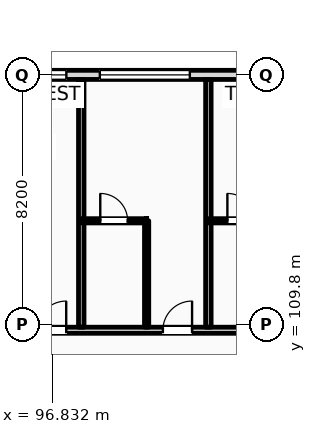
"""IFC4 building model, lengths in metres.
Left out: names, types, materials, properties, quantities, classifications, styles, units other than length and angle.
Written with IfcOpenShell. Run it as: python <this file> out.ifc"""

import sys

from ifc_helpers import new_model, si_unit, direction, frame, frame_2d, origin, place, context, subcontext, project, spatial, rectangle, extrude, element, fill, save


model = new_model("IFC4")
c1 = context("Model", 3, precision=1e-05, world=origin(), true_north=direction((0.0, 1.0)))
c2 = subcontext(c1, "Body", "Model", "MODEL_VIEW")
j1 = project(units=[si_unit("LENGTHUNIT", "METRE"), si_unit("PLANEANGLEUNIT", "RADIAN")], contexts=[c1])
p1 = place(None, origin())
s1 = spatial("IfcSite", under=j1, at=p1, CompositionType="ELEMENT")
p2 = place(p1, origin())
s2 = spatial("IfcBuilding", under=s1, at=p2, CompositionType="ELEMENT")
p3 = place(p2, frame((0.0, 0.0, 16.2)))
s3 = spatial("IfcBuildingStorey", under=s2, at=p3, CompositionType="ELEMENT", Elevation=16.2)
p4 = place(p3, frame((22.5, 118.0, 0.0), z_axis=(0.0, 0.0, 1.0), x_axis=(1.0, 0.0, 0.0)))
e1 = element("IfcWall", 1, at=p4, inside=s3, PredefinedType="STANDARD", context=c2, shape_type="SweptSolid", body=[
    extrude(rectangle(XDim=97.5, YDim=0.3, at=frame_2d((48.75, 0.0))), origin(), (0.0, 0.0, 1.0), 3.36),
])
p5 = place(p4, frame((3.721, 0.0, 0.9)))
e2 = element("IfcOpeningElement", 2, at=p5, cuts=e1, PredefinedType="OPENING", context=c2, shape_type="SweptSolid", body=[
    extrude(rectangle(XDim=0.9, YDim=1.8, at=frame_2d((0.45, 0.9))), frame((0.0, 0.16, 0.0), z_axis=(0.0, -1.0, 0.0), x_axis=(1.0, 0.0, 0.0)), (0.0, 0.0, 1.0), 0.32),
])
p6 = place(p4, frame((6.447, 0.0, 0.9)))
e3 = element("IfcOpeningElement", 3, at=p6, cuts=e1, PredefinedType="OPENING", context=c2, shape_type="SweptSolid", body=[
    extrude(rectangle(XDim=1.35, YDim=1.85, at=frame_2d((0.675, 0.925))), frame((0.0, 0.16, 0.0), z_axis=(0.0, -1.0, 0.0), x_axis=(1.0, 0.0, 0.0)), (0.0, 0.0, 1.0), 0.32),
])
p7 = place(p4, frame((11.363, 0.0, 0.9)))
e4 = element("IfcOpeningElement", 4, at=p7, cuts=e1, PredefinedType="OPENING", context=c2, shape_type="SweptSolid", body=[
    extrude(rectangle(XDim=1.5, YDim=1.9, at=frame_2d((0.75, 0.95))), frame((0.0, 0.16, 0.0), z_axis=(0.0, -1.0, 0.0), x_axis=(1.0, 0.0, 0.0)), (0.0, 0.0, 1.0), 0.32),
])
p8 = place(p4, frame((15.078, 0.0, 0.9)))
e5 = element("IfcOpeningElement", 5, at=p8, cuts=e1, PredefinedType="OPENING", context=c2, shape_type="SweptSolid", body=[
    extrude(rectangle(XDim=1.65, YDim=1.95, at=frame_2d((0.825, 0.975))), frame((0.0, 0.16, 0.0), z_axis=(0.0, -1.0, 0.0), x_axis=(1.0, 0.0, 0.0)), (0.0, 0.0, 1.0), 0.32),
])
p9 = place(p4, frame((19.395, 0.0, 0.9)))
e6 = element("IfcOpeningElement", 6, at=p9, cuts=e1, PredefinedType="OPENING", context=c2, shape_type="SweptSolid", body=[
    extrude(rectangle(XDim=1.8, YDim=2.0, at=frame_2d((0.9, 1.0))), frame((0.0, 0.16, 0.0), z_axis=(0.0, -1.0, 0.0), x_axis=(1.0, 0.0, 0.0)), (0.0, 0.0, 1.0), 0.32),
])
p10 = place(p4, frame((23.31, 0.0, 0.9)))
e7 = element("IfcOpeningElement", 7, at=p10, cuts=e1, PredefinedType="OPENING", context=c2, shape_type="SweptSolid", body=[
    extrude(rectangle(XDim=1.95, YDim=2.05, at=frame_2d((0.975, 1.025))), frame((0.0, 0.16, 0.0), z_axis=(0.0, -1.0, 0.0), x_axis=(1.0, 0.0, 0.0)), (0.0, 0.0, 1.0), 0.32),
])
p11 = place(p4, frame((28.026, 0.0, 0.9)))
e8 = element("IfcOpeningElement", 8, at=p11, cuts=e1, PredefinedType="OPENING", context=c2, shape_type="SweptSolid", body=[
    extrude(rectangle(XDim=2.1, YDim=2.1, at=frame_2d((1.05, 1.05))), frame((0.0, 0.16, 0.0), z_axis=(0.0, -1.0, 0.0), x_axis=(1.0, 0.0, 0.0)), (0.0, 0.0, 1.0), 0.32),
])
p12 = place(p4, frame((31.941, 0.0, 0.9)))
e9 = element("IfcOpeningElement", 9, at=p12, cuts=e1, PredefinedType="OPENING", context=c2, shape_type="SweptSolid", body=[
    extrude(rectangle(XDim=1.1, YDim=2.15, at=frame_2d((0.55, 1.075))), frame((0.0, 0.16, 0.0), z_axis=(0.0, -1.0, 0.0), x_axis=(1.0, 0.0, 0.0)), (0.0, 0.0, 1.0), 0.32),
])
p13 = place(p4, frame((36.657, 0.0, 0.9)))
e10 = element("IfcOpeningElement", 10, at=p13, cuts=e1, PredefinedType="OPENING", context=c2, shape_type="SweptSolid", body=[
    extrude(rectangle(XDim=2.4, YDim=2.2, at=frame_2d((1.2, 1.1))), frame((0.0, 0.16, 0.0), z_axis=(0.0, -1.0, 0.0), x_axis=(1.0, 0.0, 0.0)), (0.0, 0.0, 1.0), 0.32),
])
p14 = place(p4, frame((42.574, 0.0, 0.9)))
e11 = element("IfcOpeningElement", 11, at=p14, cuts=e1, PredefinedType="OPENING", context=c2, shape_type="SweptSolid", body=[
    extrude(rectangle(XDim=1.35, YDim=2.25, at=frame_2d((0.675, 1.125))), frame((0.0, 0.16, 0.0), z_axis=(0.0, -1.0, 0.0), x_axis=(1.0, 0.0, 0.0)), (0.0, 0.0, 1.0), 0.32),
])
p15 = place(p4, frame((45.289, 0.0, 0.9)))
e12 = element("IfcOpeningElement", 12, at=p15, cuts=e1, PredefinedType="OPENING", context=c2, shape_type="SweptSolid", body=[
    extrude(rectangle(XDim=2.7, YDim=2.28, at=frame_2d((1.35, 1.14))), frame((0.0, 0.16, 0.0), z_axis=(0.0, -1.0, 0.0), x_axis=(1.0, 0.0, 0.0)), (0.0, 0.0, 1.0), 0.32),
])
p16 = place(p4, frame((50.406, 0.0, 0.9)))
e13 = element("IfcOpeningElement", 13, at=p16, cuts=e1, PredefinedType="OPENING", context=c2, shape_type="SweptSolid", body=[
    extrude(rectangle(XDim=1.8, YDim=2.28, at=frame_2d((0.9, 1.14))), frame((0.0, 0.16, 0.0), z_axis=(0.0, -1.0, 0.0), x_axis=(1.0, 0.0, 0.0)), (0.0, 0.0, 1.0), 0.32),
])
p17 = place(p4, frame((53.922, 0.0, 0.9)))
e14 = element("IfcOpeningElement", 14, at=p17, cuts=e1, PredefinedType="OPENING", context=c2, shape_type="SweptSolid", body=[
    extrude(rectangle(XDim=1.8, YDim=2.28, at=frame_2d((0.9, 1.14))), frame((0.0, 0.16, 0.0), z_axis=(0.0, -1.0, 0.0), x_axis=(1.0, 0.0, 0.0)), (0.0, 0.0, 1.0), 0.32),
])
p18 = place(p4, frame((58.332, 0.0, 0.9)))
e15 = element("IfcOpeningElement", 15, at=p18, cuts=e1, PredefinedType="OPENING", context=c2, shape_type="SweptSolid", body=[
    extrude(rectangle(XDim=2.961, YDim=2.28, at=frame_2d((1.48, 1.14))), frame((0.0, 0.16, 0.0), z_axis=(0.0, -1.0, 0.0), x_axis=(1.0, 0.0, 0.0)), (0.0, 0.0, 1.0), 0.32),
])
p19 = place(p4, frame((62.513, 0.0, 0.9)))
e16 = element("IfcOpeningElement", 16, at=p19, cuts=e1, PredefinedType="OPENING", context=c2, shape_type="SweptSolid", body=[
    extrude(rectangle(XDim=1.8, YDim=2.28, at=frame_2d((0.9, 1.14))), frame((0.0, 0.16, 0.0), z_axis=(0.0, -1.0, 0.0), x_axis=(1.0, 0.0, 0.0)), (0.0, 0.0, 1.0), 0.32),
])
p20 = place(p4, frame((67.114, 0.0, 0.9)))
e17 = element("IfcOpeningElement", 17, at=p20, cuts=e1, PredefinedType="OPENING", context=c2, shape_type="SweptSolid", body=[
    extrude(rectangle(XDim=2.961, YDim=2.28, at=frame_2d((1.48, 1.14))), frame((0.0, 0.16, 0.0), z_axis=(0.0, -1.0, 0.0), x_axis=(1.0, 0.0, 0.0)), (0.0, 0.0, 1.0), 0.32),
])
p21 = place(p4, frame((73.695, 0.0, 0.9)))
e18 = element("IfcOpeningElement", 18, at=p21, cuts=e1, PredefinedType="OPENING", context=c2, shape_type="SweptSolid", body=[
    extrude(rectangle(XDim=1.1, YDim=2.28, at=frame_2d((0.55, 1.14))), frame((0.0, 0.16, 0.0), z_axis=(0.0, -1.0, 0.0), x_axis=(1.0, 0.0, 0.0)), (0.0, 0.0, 1.0), 0.32),
])
p22 = place(p4, frame((75.895, 0.0, 0.9)))
e19 = element("IfcOpeningElement", 19, at=p22, cuts=e1, PredefinedType="OPENING", context=c2, shape_type="SweptSolid", body=[
    extrude(rectangle(XDim=2.961, YDim=2.28, at=frame_2d((1.48, 1.14))), frame((0.0, 0.16, 0.0), z_axis=(0.0, -1.0, 0.0), x_axis=(1.0, 0.0, 0.0)), (0.0, 0.0, 1.0), 0.32),
])
p23 = place(p4, frame((81.676, 0.0, 0.9)))
e20 = element("IfcOpeningElement", 20, at=p23, cuts=e1, PredefinedType="OPENING", context=c2, shape_type="SweptSolid", body=[
    extrude(rectangle(XDim=1.8, YDim=2.28, at=frame_2d((0.9, 1.14))), frame((0.0, 0.16, 0.0), z_axis=(0.0, -1.0, 0.0), x_axis=(1.0, 0.0, 0.0)), (0.0, 0.0, 1.0), 0.32),
])
p24 = place(p4, frame((84.677, 0.0, 0.9)))
e21 = element("IfcOpeningElement", 21, at=p24, cuts=e1, PredefinedType="OPENING", context=c2, shape_type="SweptSolid", body=[
    extrude(rectangle(XDim=2.961, YDim=2.28, at=frame_2d((1.48, 1.14))), frame((0.0, 0.16, 0.0), z_axis=(0.0, -1.0, 0.0), x_axis=(1.0, 0.0, 0.0)), (0.0, 0.0, 1.0), 0.32),
])
p25 = place(p4, frame((89.999, 0.0, 0.9)))
e22 = element("IfcOpeningElement", 22, at=p25, cuts=e1, PredefinedType="OPENING", context=c2, shape_type="SweptSolid", body=[
    extrude(rectangle(XDim=1.1, YDim=1.5, at=frame_2d((0.55, 0.75))), frame((0.0, 0.16, 0.0), z_axis=(0.0, -1.0, 0.0), x_axis=(1.0, 0.0, 0.0)), (0.0, 0.0, 1.0), 0.32),
])
p26 = place(p4, frame((94.35, 0.0, 0.9)))
e23 = element("IfcOpeningElement", 23, at=p26, cuts=e1, PredefinedType="OPENING", context=c2, shape_type="SweptSolid", body=[
    extrude(rectangle(XDim=1.25, YDim=1.6, at=frame_2d((0.625, 0.8))), frame((0.0, 0.16, 0.0), z_axis=(0.0, -1.0, 0.0), x_axis=(1.0, 0.0, 0.0)), (0.0, 0.0, 1.0), 0.32),
])
p27 = place(p3, frame((10.65, 109.6, 0.0), z_axis=(0.0, 0.0, 1.0), x_axis=(1.0, 0.0, 0.0)))
e24 = element("IfcWall", 24, at=p27, inside=s3, PredefinedType="PARTITIONING", context=c2, shape_type="SweptSolid", body=[
    extrude(rectangle(XDim=109.21, YDim=0.2, at=frame_2d((54.605, 0.0))), origin(), (0.0, 0.0, 1.0), 3.36),
])
p28 = place(p27, frame((15.43, 0.0, 0.0)))
e25 = element("IfcOpeningElement", 25, at=p28, cuts=e24, PredefinedType="OPENING", context=c2, shape_type="SweptSolid", body=[
    extrude(rectangle(XDim=1.02, YDim=2.2, at=frame_2d((0.51, 1.1))), frame((0.0, 0.11, 0.0), z_axis=(0.0, -1.0, 0.0), x_axis=(1.0, 0.0, 0.0)), (0.0, 0.0, 1.0), 0.22),
])
p29 = place(p27, frame((19.537, 0.0, 0.0)))
e26 = element("IfcOpeningElement", 26, at=p29, cuts=e24, PredefinedType="OPENING", context=c2, shape_type="SweptSolid", body=[
    extrude(rectangle(XDim=1.02, YDim=2.2, at=frame_2d((0.51, 1.1))), frame((0.0, 0.11, 0.0), z_axis=(0.0, -1.0, 0.0), x_axis=(1.0, 0.0, 0.0)), (0.0, 0.0, 1.0), 0.22),
])
p30 = place(p27, frame((23.928, 0.0, 0.0)))
e27 = element("IfcOpeningElement", 27, at=p30, cuts=e24, PredefinedType="OPENING", context=c2, shape_type="SweptSolid", body=[
    extrude(rectangle(XDim=1.02, YDim=2.2, at=frame_2d((0.51, 1.1))), frame((0.0, 0.11, 0.0), z_axis=(0.0, -1.0, 0.0), x_axis=(1.0, 0.0, 0.0)), (0.0, 0.0, 1.0), 0.22),
])
p31 = place(p27, frame((26.169, 0.0, 0.0)))
e28 = element("IfcOpeningElement", 28, at=p31, cuts=e24, PredefinedType="OPENING", context=c2, shape_type="SweptSolid", body=[
    extrude(rectangle(XDim=1.02, YDim=2.2, at=frame_2d((0.51, 1.1))), frame((0.0, 0.11, 0.0), z_axis=(0.0, -1.0, 0.0), x_axis=(1.0, 0.0, 0.0)), (0.0, 0.0, 1.0), 0.22),
])
p32 = place(p27, frame((32.739, 0.0, 0.0)))
e29 = element("IfcOpeningElement", 29, at=p32, cuts=e24, PredefinedType="OPENING", context=c2, shape_type="SweptSolid", body=[
    extrude(rectangle(XDim=0.96, YDim=2.2, at=frame_2d((0.48, 1.1))), frame((0.0, 0.11, 0.0), z_axis=(0.0, -1.0, 0.0), x_axis=(1.0, 0.0, 0.0)), (0.0, 0.0, 1.0), 0.22),
])
p33 = place(p27, frame((34.98, 0.0, 0.0)))
e30 = element("IfcOpeningElement", 30, at=p33, cuts=e24, PredefinedType="OPENING", context=c2, shape_type="SweptSolid", body=[
    extrude(rectangle(XDim=0.96, YDim=2.2, at=frame_2d((0.48, 1.1))), frame((0.0, 0.11, 0.0), z_axis=(0.0, -1.0, 0.0), x_axis=(1.0, 0.0, 0.0)), (0.0, 0.0, 1.0), 0.22),
])
p34 = place(p27, frame((41.521, 0.0, 0.0)))
e31 = element("IfcOpeningElement", 31, at=p34, cuts=e24, PredefinedType="OPENING", context=c2, shape_type="SweptSolid", body=[
    extrude(rectangle(XDim=0.96, YDim=2.2, at=frame_2d((0.48, 1.1))), frame((0.0, 0.11, 0.0), z_axis=(0.0, -1.0, 0.0), x_axis=(1.0, 0.0, 0.0)), (0.0, 0.0, 1.0), 0.22),
])
p35 = place(p27, frame((43.512, 0.0, 0.0)))
e32 = element("IfcOpeningElement", 32, at=p35, cuts=e24, PredefinedType="OPENING", context=c2, shape_type="SweptSolid", body=[
    extrude(rectangle(XDim=0.96, YDim=2.2, at=frame_2d((0.48, 1.1))), frame((0.0, 0.11, 0.0), z_axis=(0.0, -1.0, 0.0), x_axis=(1.0, 0.0, 0.0)), (0.0, 0.0, 1.0), 0.22),
])
p36 = place(p27, frame((50.303, 0.0, 0.0)))
e33 = element("IfcOpeningElement", 33, at=p36, cuts=e24, PredefinedType="OPENING", context=c2, shape_type="SweptSolid", body=[
    extrude(rectangle(XDim=0.96, YDim=2.2, at=frame_2d((0.48, 1.1))), frame((0.0, 0.11, 0.0), z_axis=(0.0, -1.0, 0.0), x_axis=(1.0, 0.0, 0.0)), (0.0, 0.0, 1.0), 0.22),
])
p37 = place(p27, frame((54.944, 0.0, 0.0)))
e34 = element("IfcOpeningElement", 34, at=p37, cuts=e24, PredefinedType="OPENING", context=c2, shape_type="SweptSolid", body=[
    extrude(rectangle(XDim=0.96, YDim=2.2, at=frame_2d((0.48, 1.1))), frame((0.0, 0.11, 0.0), z_axis=(0.0, -1.0, 0.0), x_axis=(1.0, 0.0, 0.0)), (0.0, 0.0, 1.0), 0.22),
])
p38 = place(p27, frame((59.085, 0.0, 0.0)))
e35 = element("IfcOpeningElement", 35, at=p38, cuts=e24, PredefinedType="OPENING", context=c2, shape_type="SweptSolid", body=[
    extrude(rectangle(XDim=0.96, YDim=2.2, at=frame_2d((0.48, 1.1))), frame((0.0, 0.11, 0.0), z_axis=(0.0, -1.0, 0.0), x_axis=(1.0, 0.0, 0.0)), (0.0, 0.0, 1.0), 0.22),
])
p39 = place(p27, frame((63.476, 0.0, 0.0)))
e36 = element("IfcOpeningElement", 36, at=p39, cuts=e24, PredefinedType="OPENING", context=c2, shape_type="SweptSolid", body=[
    extrude(rectangle(XDim=0.96, YDim=2.2, at=frame_2d((0.48, 1.1))), frame((0.0, 0.11, 0.0), z_axis=(0.0, -1.0, 0.0), x_axis=(1.0, 0.0, 0.0)), (0.0, 0.0, 1.0), 0.22),
])
p40 = place(p27, frame((65.716, 0.0, 0.0)))
e37 = element("IfcOpeningElement", 37, at=p40, cuts=e24, PredefinedType="OPENING", context=c2, shape_type="SweptSolid", body=[
    extrude(rectangle(XDim=0.96, YDim=2.2, at=frame_2d((0.48, 1.1))), frame((0.0, 0.11, 0.0), z_axis=(0.0, -1.0, 0.0), x_axis=(1.0, 0.0, 0.0)), (0.0, 0.0, 1.0), 0.22),
])
p41 = place(p27, frame((72.257, 0.0, 0.0)))
e38 = element("IfcOpeningElement", 38, at=p41, cuts=e24, PredefinedType="OPENING", context=c2, shape_type="SweptSolid", body=[
    extrude(rectangle(XDim=0.96, YDim=2.2, at=frame_2d((0.48, 1.1))), frame((0.0, 0.11, 0.0), z_axis=(0.0, -1.0, 0.0), x_axis=(1.0, 0.0, 0.0)), (0.0, 0.0, 1.0), 0.22),
])
p42 = place(p27, frame((74.498, 0.0, 0.0)))
e39 = element("IfcOpeningElement", 39, at=p42, cuts=e24, PredefinedType="OPENING", context=c2, shape_type="SweptSolid", body=[
    extrude(rectangle(XDim=0.96, YDim=2.2, at=frame_2d((0.48, 1.1))), frame((0.0, 0.11, 0.0), z_axis=(0.0, -1.0, 0.0), x_axis=(1.0, 0.0, 0.0)), (0.0, 0.0, 1.0), 0.22),
])
p43 = place(p27, frame((81.039, 0.0, 0.0)))
e40 = element("IfcOpeningElement", 40, at=p43, cuts=e24, PredefinedType="OPENING", context=c2, shape_type="SweptSolid", body=[
    extrude(rectangle(XDim=0.96, YDim=2.2, at=frame_2d((0.48, 1.1))), frame((0.0, 0.11, 0.0), z_axis=(0.0, -1.0, 0.0), x_axis=(1.0, 0.0, 0.0)), (0.0, 0.0, 1.0), 0.22),
])
p44 = place(p27, frame((85.68, 0.0, 0.0)))
e41 = element("IfcOpeningElement", 41, at=p44, cuts=e24, PredefinedType="OPENING", context=c2, shape_type="SweptSolid", body=[
    extrude(rectangle(XDim=0.96, YDim=2.2, at=frame_2d((0.48, 1.1))), frame((0.0, 0.11, 0.0), z_axis=(0.0, -1.0, 0.0), x_axis=(1.0, 0.0, 0.0)), (0.0, 0.0, 1.0), 0.22),
])
p45 = place(p27, frame((89.82, 0.0, 0.0)))
e42 = element("IfcOpeningElement", 42, at=p45, cuts=e24, PredefinedType="OPENING", context=c2, shape_type="SweptSolid", body=[
    extrude(rectangle(XDim=0.96, YDim=2.2, at=frame_2d((0.48, 1.1))), frame((0.0, 0.11, 0.0), z_axis=(0.0, -1.0, 0.0), x_axis=(1.0, 0.0, 0.0)), (0.0, 0.0, 1.0), 0.22),
])
p46 = place(p27, frame((94.211, 0.0, 0.0)))
e43 = element("IfcOpeningElement", 43, at=p46, cuts=e24, PredefinedType="OPENING", context=c2, shape_type="SweptSolid", body=[
    extrude(rectangle(XDim=0.96, YDim=2.2, at=frame_2d((0.48, 1.1))), frame((0.0, 0.11, 0.0), z_axis=(0.0, -1.0, 0.0), x_axis=(1.0, 0.0, 0.0)), (0.0, 0.0, 1.0), 0.22),
])
p47 = place(p27, frame((98.602, 0.0, 0.0)))
e44 = element("IfcOpeningElement", 44, at=p47, cuts=e24, PredefinedType="OPENING", context=c2, shape_type="SweptSolid", body=[
    extrude(rectangle(XDim=0.96, YDim=2.2, at=frame_2d((0.48, 1.1))), frame((0.0, 0.11, 0.0), z_axis=(0.0, -1.0, 0.0), x_axis=(1.0, 0.0, 0.0)), (0.0, 0.0, 1.0), 0.22),
])
p48 = place(p27, frame((102.993, 0.0, 0.0)))
e45 = element("IfcOpeningElement", 45, at=p48, cuts=e24, PredefinedType="OPENING", context=c2, shape_type="SweptSolid", body=[
    extrude(rectangle(XDim=0.96, YDim=2.2, at=frame_2d((0.48, 1.1))), frame((0.0, 0.11, 0.0), z_axis=(0.0, -1.0, 0.0), x_axis=(1.0, 0.0, 0.0)), (0.0, 0.0, 1.0), 0.22),
])
p49 = place(p27, frame((105.269, 0.0, 0.0)))
e46 = element("IfcOpeningElement", 46, at=p49, cuts=e24, PredefinedType="OPENING", context=c2, shape_type="SweptSolid", body=[
    extrude(rectangle(XDim=0.96, YDim=2.2, at=frame_2d((0.48, 1.1))), frame((0.0, 0.11, 0.0), z_axis=(0.0, -1.0, 0.0), x_axis=(1.0, 0.0, 0.0)), (0.0, 0.0, 1.0), 0.22),
])
p50 = place(p27, frame((2.716, 0.0, 0.0)))
e47 = element("IfcOpeningElement", 47, at=p50, cuts=e24, PredefinedType="OPENING", context=c2, shape_type="SweptSolid", body=[
    extrude(rectangle(XDim=1.35, YDim=2.25, at=frame_2d((0.675, 1.125))), frame((0.0, 0.11, 0.0), z_axis=(0.0, -1.0, 0.0), x_axis=(1.0, 0.0, 0.0)), (0.0, 0.0, 1.0), 0.22),
])
p51 = place(p27, frame((6.65, 0.0, 0.0)))
e48 = element("IfcOpeningElement", 48, at=p51, cuts=e24, PredefinedType="OPENING", context=c2, shape_type="SweptSolid", body=[
    extrude(rectangle(XDim=1.35, YDim=2.25, at=frame_2d((0.675, 1.125))), frame((0.0, 0.11, 0.0), z_axis=(0.0, -1.0, 0.0), x_axis=(1.0, 0.0, 0.0)), (0.0, 0.0, 1.0), 0.22),
])
p52 = place(p27, frame((10.583, 0.0, 0.0)))
e49 = element("IfcOpeningElement", 49, at=p52, cuts=e24, PredefinedType="OPENING", context=c2, shape_type="SweptSolid", body=[
    extrude(rectangle(XDim=1.35, YDim=2.25, at=frame_2d((0.675, 1.125))), frame((0.0, 0.11, 0.0), z_axis=(0.0, -1.0, 0.0), x_axis=(1.0, 0.0, 0.0)), (0.0, 0.0, 1.0), 0.22),
])
p53 = place(p3, frame((97.785, 109.7, 0.0), z_axis=(0.0, 0.0, 1.0), x_axis=(0.0, 1.0, 0.0)))
e50 = element("IfcWall", 50, at=p53, inside=s3, PredefinedType="PARTITIONING", context=c2, shape_type="SweptSolid", body=[
    extrude(rectangle(XDim=8.15, YDim=0.18, at=frame_2d((4.075, 0.0))), origin(), (0.0, 0.0, 1.0), 3.61),
])
p54 = place(p3, frame((101.966, 109.7, 0.0), z_axis=(0.0, 0.0, 1.0), x_axis=(0.0, 1.0, 0.0)))
e51 = element("IfcWall", 51, at=p54, inside=s3, PredefinedType="PARTITIONING", context=c2, shape_type="SweptSolid", body=[
    extrude(rectangle(XDim=8.15, YDim=0.18, at=frame_2d((4.075, 0.0))), origin(), (0.0, 0.0, 1.0), 3.92),
])
p55 = place(p3, frame((99.935, 109.7, 0.0), z_axis=(0.0, 0.0, 1.0), x_axis=(0.0, 1.0, 0.0)))
e52 = element("IfcWall", 52, at=p55, inside=s3, PredefinedType="PARTITIONING", context=c2, shape_type="SweptSolid", body=[
    extrude(rectangle(XDim=3.5, YDim=0.14, at=frame_2d((1.75, 0.0))), origin(), (0.0, 0.0, 1.0), 3.92),
])
p56 = place(p3, frame((97.785, 113.2, 0.0), z_axis=(0.0, 0.0, 1.0), x_axis=(1.0, 0.0, 0.0)))
e53 = element("IfcWall", 53, at=p56, inside=s3, PredefinedType="PARTITIONING", context=c2, shape_type="SweptSolid", body=[
    extrude(rectangle(XDim=2.15, YDim=0.14, at=frame_2d((1.075, 0.0))), origin(), (0.0, 0.0, 1.0), 3.92),
])
p57 = place(p56, frame((0.625, 0.0, 0.0)))
e54 = element("IfcOpeningElement", 54, at=p57, cuts=e53, PredefinedType="OPENING", context=c2, shape_type="SweptSolid", body=[
    extrude(rectangle(XDim=0.9, YDim=2.1, at=frame_2d((0.45, 1.05))), frame((0.0, 0.08, 0.0), z_axis=(0.0, -1.0, 0.0), x_axis=(1.0, 0.0, 0.0)), (0.0, 0.0, 1.0), 0.16),
])
p58 = place(p3, frame((101.966, 113.2, 0.0), z_axis=(0.0, 0.0, 1.0), x_axis=(1.0, 0.0, 0.0)))
e55 = element("IfcWall", 55, at=p58, inside=s3, PredefinedType="PARTITIONING", context=c2, shape_type="SweptSolid", body=[
    extrude(rectangle(XDim=2.15, YDim=0.14, at=frame_2d((1.075, 0.0))), origin(), (0.0, 0.0, 1.0), 3.92),
])
p59 = place(p58, frame((0.625, 0.0, 0.0)))
e56 = element("IfcOpeningElement", 56, at=p59, cuts=e55, PredefinedType="OPENING", context=c2, shape_type="SweptSolid", body=[
    extrude(rectangle(XDim=0.9, YDim=2.1, at=frame_2d((0.45, 1.05))), frame((0.0, 0.08, 0.0), z_axis=(0.0, -1.0, 0.0), x_axis=(1.0, 0.0, 0.0)), (0.0, 0.0, 1.0), 0.16),
])
p60 = place(p21, origin())
e57 = element("IfcWindow", 57, at=p60, inside=s3, PartitioningType="DOUBLE_PANEL_VERTICAL", PredefinedType="WINDOW", context=c2, shape_type="SweptSolid", body=[
    extrude(rectangle(XDim=1.1, YDim=2.28, at=frame_2d((0.55, 1.14))), frame((0.0, 0.03, 0.0), z_axis=(0.0, -1.0, 0.0), x_axis=(1.0, 0.0, 0.0)), (0.0, 0.0, 1.0), 0.06),
])
fill(e18, e57)
p61 = place(p22, origin())
e58 = element("IfcWindow", 58, at=p61, inside=s3, PartitioningType="DOUBLE_PANEL_VERTICAL", PredefinedType="WINDOW", context=c2, shape_type="SweptSolid", body=[
    extrude(rectangle(XDim=2.961, YDim=2.28, at=frame_2d((1.48, 1.14))), frame((0.0, 0.03, 0.0), z_axis=(0.0, -1.0, 0.0), x_axis=(1.0, 0.0, 0.0)), (0.0, 0.0, 1.0), 0.06),
])
fill(e19, e58)
p62 = place(p44, origin())
e59 = element("IfcDoor", 59, at=p62, inside=s3, OperationType="SINGLE_SWING_RIGHT", PredefinedType="DOOR", context=c2, shape_type="SweptSolid", body=[
    extrude(rectangle(XDim=0.96, YDim=2.2, at=frame_2d((0.48, 1.1))), frame((0.0, 0.025, 0.0), z_axis=(0.0, -1.0, 0.0), x_axis=(1.0, 0.0, 0.0)), (0.0, 0.0, 1.0), 0.05),
])
fill(e41, e59)
p63 = place(p45, origin())
e60 = element("IfcDoor", 60, at=p63, inside=s3, OperationType="SINGLE_SWING_RIGHT", PredefinedType="DOOR", context=c2, shape_type="SweptSolid", body=[
    extrude(rectangle(XDim=0.96, YDim=2.2, at=frame_2d((0.48, 1.1))), frame((0.0, 0.025, 0.0), z_axis=(0.0, -1.0, 0.0), x_axis=(1.0, 0.0, 0.0)), (0.0, 0.0, 1.0), 0.05),
])
fill(e42, e60)
p64 = place(p57, origin())
e61 = element("IfcDoor", 61, at=p64, inside=s3, OperationType="SINGLE_SWING_LEFT", PredefinedType="DOOR", context=c2, shape_type="SweptSolid", body=[
    extrude(rectangle(XDim=0.9, YDim=2.1, at=frame_2d((0.45, 1.05))), frame((0.0, 0.025, 0.0), z_axis=(0.0, -1.0, 0.0), x_axis=(1.0, 0.0, 0.0)), (0.0, 0.0, 1.0), 0.05),
])
fill(e54, e61)
p65 = place(p59, origin())
e62 = element("IfcDoor", 62, at=p65, inside=s3, OperationType="SINGLE_SWING_LEFT", PredefinedType="DOOR", context=c2, shape_type="SweptSolid", body=[
    extrude(rectangle(XDim=0.9, YDim=2.1, at=frame_2d((0.45, 1.05))), frame((0.0, 0.025, 0.0), z_axis=(0.0, -1.0, 0.0), x_axis=(1.0, 0.0, 0.0)), (0.0, 0.0, 1.0), 0.05),
])
fill(e56, e62)
save(model, sys.argv[1])
